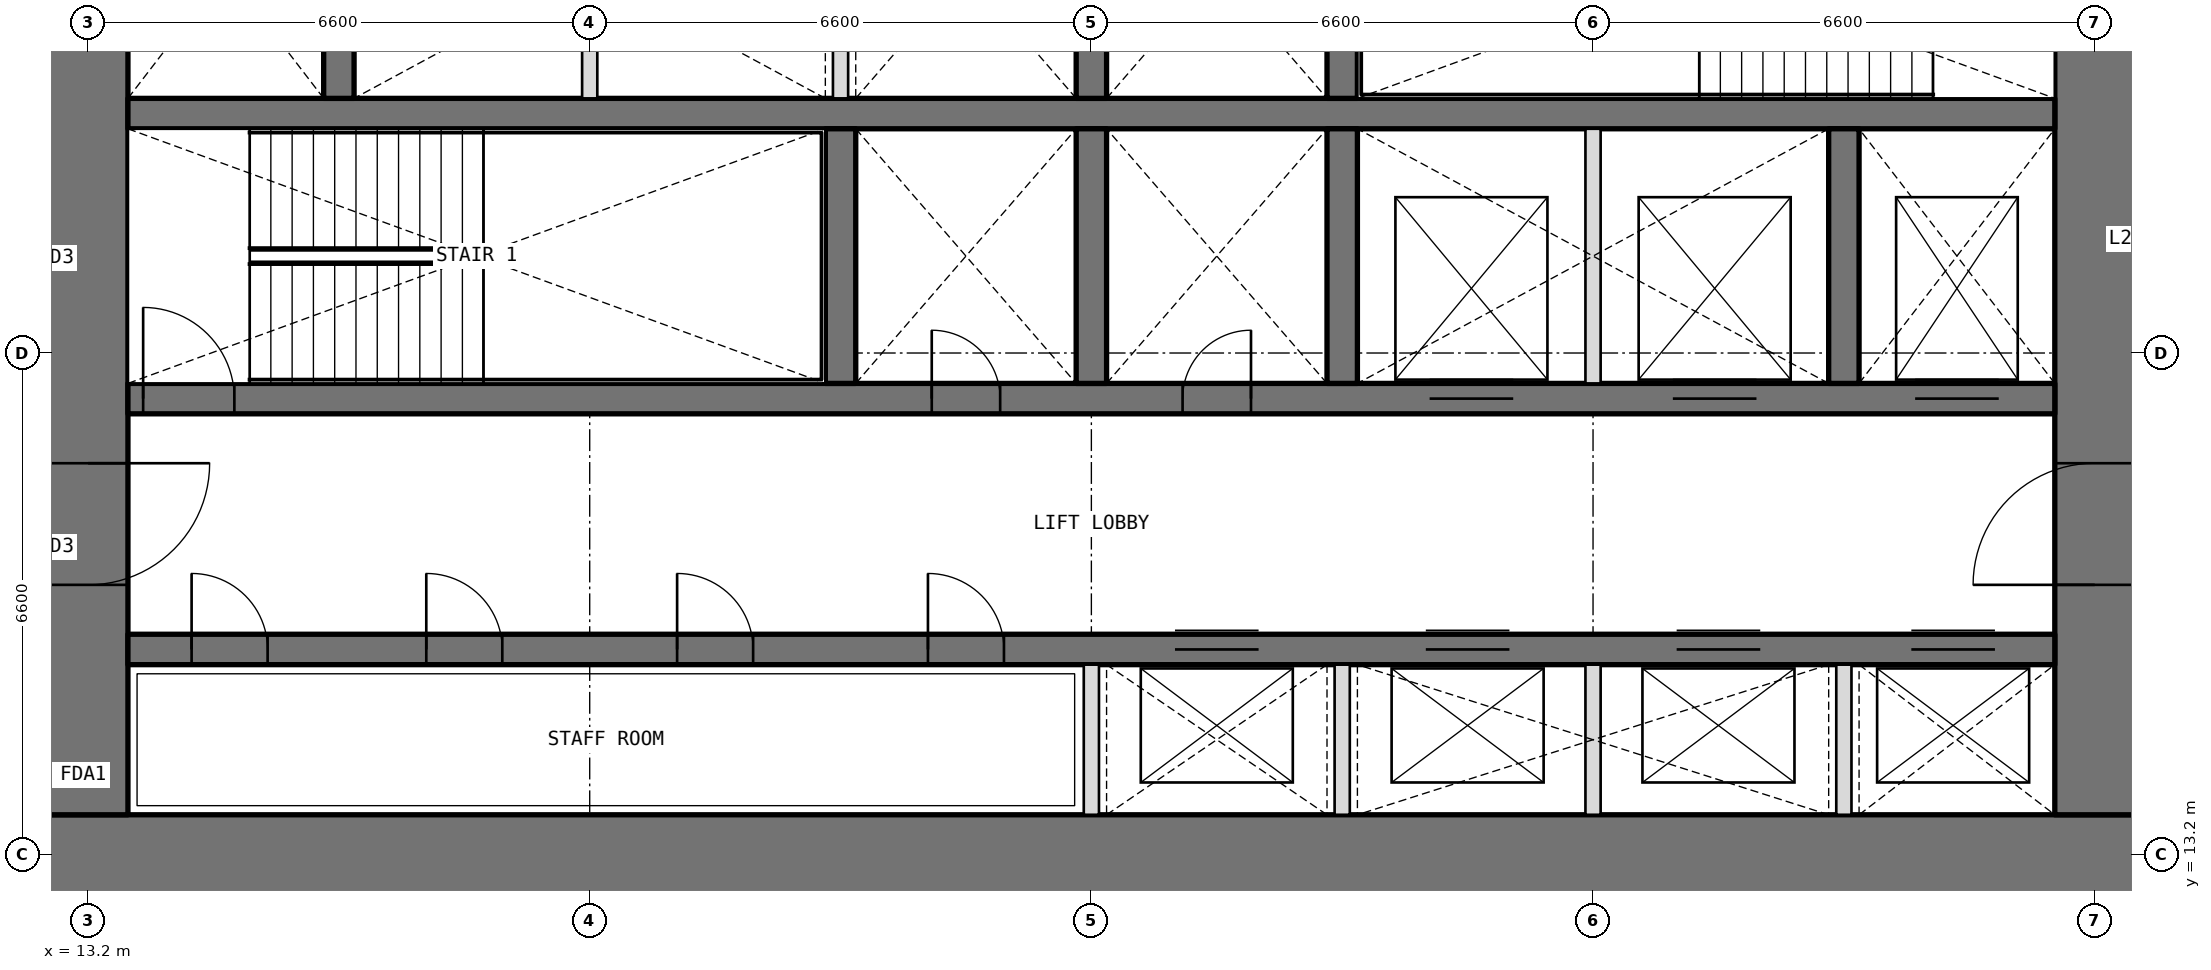
"""IFC4 building model, lengths in metres.
Left out: names, types, materials, properties, quantities, classifications, styles, units other than length and angle.
Written with IfcOpenShell. Run it as: python <this file> out.ifc"""

import sys

from ifc_helpers import new_model, si_unit, direction, frame, frame_2d, origin, place, context, subcontext, project, spatial, rectangle, extrude, element, fill, save


model = new_model("IFC4")
c1 = context("Model", 3, precision=1e-05, world=origin(), true_north=direction((0.0, 1.0)))
c2 = subcontext(c1, "Body", "Model", "MODEL_VIEW")
j1 = project(units=[si_unit("LENGTHUNIT", "METRE"), si_unit("PLANEANGLEUNIT", "RADIAN")], contexts=[c1])
p1 = place(None, origin())
s1 = spatial("IfcSite", under=j1, at=p1, CompositionType="ELEMENT")
p2 = place(p1, origin())
s2 = spatial("IfcBuilding", under=s1, at=p2, CompositionType="ELEMENT")
p3 = place(p2, frame((0.0, 0.0, 115.8)))
s3 = spatial("IfcBuildingStorey", under=s2, at=p3, CompositionType="ELEMENT", Elevation=115.8)
p4 = place(p3, frame((12.675, 13.2, 0.0), z_axis=(0.0, 0.0, 1.0), x_axis=(1.0, 0.0, 0.0)))
e1 = element("IfcWall", 1, at=p4, inside=s3, PredefinedType="SHEAR", context=c2, shape_type="SweptSolid", body=[
    extrude(rectangle(XDim=27.45, YDim=1.05, at=frame_2d((13.725, 0.0))), origin(), (0.0, 0.0, 1.0), 4.2),
])
p5 = place(p3, frame((39.6, 13.725, 0.0), z_axis=(0.0, 0.0, 1.0), x_axis=(0.0, 1.0, 0.0)))
e2 = element("IfcWall", 2, at=p5, inside=s3, PredefinedType="SHEAR", context=c2, shape_type="SweptSolid", body=[
    extrude(rectangle(XDim=18.75, YDim=1.05, at=frame_2d((9.375, 0.0))), origin(), (0.0, 0.0, 1.0), 4.2),
])
p6 = place(p5, frame((3.025, 0.0, 0.0)))
e3 = element("IfcOpeningElement", 3, at=p6, cuts=e2, PredefinedType="OPENING", context=c2, shape_type="SweptSolid", body=[
    extrude(rectangle(XDim=1.6, YDim=2.1, at=frame_2d((0.8, 1.05))), frame((0.0, 0.535, 0.0), z_axis=(0.0, -1.0, 0.0), x_axis=(1.0, 0.0, 0.0)), (0.0, 0.0, 1.0), 1.07),
])
p7 = place(p5, frame((13.825, 0.0, 0.0)))
e4 = element("IfcOpeningElement", 4, at=p7, cuts=e2, PredefinedType="OPENING", context=c2, shape_type="SweptSolid", body=[
    extrude(rectangle(XDim=1.6, YDim=2.1, at=frame_2d((0.8, 1.05))), frame((0.0, 0.535, 0.0), z_axis=(0.0, -1.0, 0.0), x_axis=(1.0, 0.0, 0.0)), (0.0, 0.0, 1.0), 1.07),
])
p8 = place(p3, frame((13.2, 32.475, 0.0), z_axis=(0.0, 0.0, 1.0), x_axis=(0.0, -1.0, 0.0)))
e5 = element("IfcWall", 5, at=p8, inside=s3, PredefinedType="SHEAR", context=c2, shape_type="SweptSolid", body=[
    extrude(rectangle(XDim=18.75, YDim=1.05, at=frame_2d((9.375, 0.0))), origin(), (0.0, 0.0, 1.0), 4.2),
])
p9 = place(p8, frame((14.125, 0.0, 0.0)))
e6 = element("IfcOpeningElement", 6, at=p9, cuts=e5, PredefinedType="OPENING", context=c2, shape_type="SweptSolid", body=[
    extrude(rectangle(XDim=1.6, YDim=2.1, at=frame_2d((0.8, 1.05))), frame((0.0, 0.535, 0.0), z_axis=(0.0, -1.0, 0.0), x_axis=(1.0, 0.0, 0.0)), (0.0, 0.0, 1.0), 1.07),
])
p10 = place(p8, frame((3.325, 0.0, 0.0)))
e7 = element("IfcOpeningElement", 7, at=p10, cuts=e5, PredefinedType="OPENING", context=c2, shape_type="SweptSolid", body=[
    extrude(rectangle(XDim=1.6, YDim=2.1, at=frame_2d((0.8, 1.05))), frame((0.0, 0.535, 0.0), z_axis=(0.0, -1.0, 0.0), x_axis=(1.0, 0.0, 0.0)), (0.0, 0.0, 1.0), 1.07),
])
p11 = place(p3, frame((13.725, 15.9, 0.0), z_axis=(0.0, 0.0, 1.0), x_axis=(1.0, 0.0, 0.0)))
e8 = element("IfcWall", 8, at=p11, inside=s3, PredefinedType="SHEAR", context=c2, shape_type="SweptSolid", body=[
    extrude(rectangle(XDim=25.35, YDim=0.4, at=frame_2d((12.675, 0.0))), origin(), (0.0, 0.0, 1.0), 4.2),
])
p12 = place(p11, frame((0.837, 0.0, 0.0)))
e9 = element("IfcOpeningElement", 9, at=p12, cuts=e8, PredefinedType="OPENING", context=c2, shape_type="SweptSolid", body=[
    extrude(rectangle(XDim=1.0, YDim=2.1, at=frame_2d((0.5, 1.05))), frame((0.0, 0.21, 0.0), z_axis=(0.0, -1.0, 0.0), x_axis=(1.0, 0.0, 0.0)), (0.0, 0.0, 1.0), 0.42),
])
p13 = place(p11, frame((3.925, 0.0, 0.0)))
e10 = element("IfcOpeningElement", 10, at=p13, cuts=e8, PredefinedType="OPENING", context=c2, shape_type="SweptSolid", body=[
    extrude(rectangle(XDim=1.0, YDim=2.1, at=frame_2d((0.5, 1.05))), frame((0.0, 0.21, 0.0), z_axis=(0.0, -1.0, 0.0), x_axis=(1.0, 0.0, 0.0)), (0.0, 0.0, 1.0), 0.42),
])
p14 = place(p11, frame((7.225, 0.0, 0.0)))
e11 = element("IfcOpeningElement", 11, at=p14, cuts=e8, PredefinedType="OPENING", context=c2, shape_type="SweptSolid", body=[
    extrude(rectangle(XDim=1.0, YDim=2.1, at=frame_2d((0.5, 1.05))), frame((0.0, 0.21, 0.0), z_axis=(0.0, -1.0, 0.0), x_axis=(1.0, 0.0, 0.0)), (0.0, 0.0, 1.0), 0.42),
])
p15 = place(p11, frame((10.525, 0.0, 0.0)))
e12 = element("IfcOpeningElement", 12, at=p15, cuts=e8, PredefinedType="OPENING", context=c2, shape_type="SweptSolid", body=[
    extrude(rectangle(XDim=1.0, YDim=2.1, at=frame_2d((0.5, 1.05))), frame((0.0, 0.21, 0.0), z_axis=(0.0, -1.0, 0.0), x_axis=(1.0, 0.0, 0.0)), (0.0, 0.0, 1.0), 0.42),
])
p16 = place(p11, frame((13.775, 0.0, 0.0)))
e13 = element("IfcOpeningElement", 13, at=p16, cuts=e8, PredefinedType="OPENING", context=c2, shape_type="SweptSolid", body=[
    extrude(rectangle(XDim=1.1, YDim=2.1, at=frame_2d((0.55, 1.05))), frame((0.0, 0.21, 0.0), z_axis=(0.0, -1.0, 0.0), x_axis=(1.0, 0.0, 0.0)), (0.0, 0.0, 1.0), 0.42),
])
p17 = place(p11, frame((17.075, 0.0, 0.0)))
e14 = element("IfcOpeningElement", 14, at=p17, cuts=e8, PredefinedType="OPENING", context=c2, shape_type="SweptSolid", body=[
    extrude(rectangle(XDim=1.1, YDim=2.1, at=frame_2d((0.55, 1.05))), frame((0.0, 0.21, 0.0), z_axis=(0.0, -1.0, 0.0), x_axis=(1.0, 0.0, 0.0)), (0.0, 0.0, 1.0), 0.42),
])
p18 = place(p11, frame((20.375, 0.0, 0.0)))
e15 = element("IfcOpeningElement", 15, at=p18, cuts=e8, PredefinedType="OPENING", context=c2, shape_type="SweptSolid", body=[
    extrude(rectangle(XDim=1.1, YDim=2.1, at=frame_2d((0.55, 1.05))), frame((0.0, 0.21, 0.0), z_axis=(0.0, -1.0, 0.0), x_axis=(1.0, 0.0, 0.0)), (0.0, 0.0, 1.0), 0.42),
])
p19 = place(p11, frame((23.462, 0.0, 0.0)))
e16 = element("IfcOpeningElement", 16, at=p19, cuts=e8, PredefinedType="OPENING", context=c2, shape_type="SweptSolid", body=[
    extrude(rectangle(XDim=1.1, YDim=2.1, at=frame_2d((0.55, 1.05))), frame((0.0, 0.21, 0.0), z_axis=(0.0, -1.0, 0.0), x_axis=(1.0, 0.0, 0.0)), (0.0, 0.0, 1.0), 0.42),
])
p20 = place(p3, frame((13.725, 19.2, 0.0), z_axis=(0.0, 0.0, 1.0), x_axis=(1.0, 0.0, 0.0)))
e17 = element("IfcWall", 17, at=p20, inside=s3, PredefinedType="SHEAR", context=c2, shape_type="SweptSolid", body=[
    extrude(rectangle(XDim=25.35, YDim=0.4, at=frame_2d((12.675, 0.0))), origin(), (0.0, 0.0, 1.0), 4.2),
])
p21 = place(p20, frame((10.575, 0.0, 0.0)))
e18 = element("IfcOpeningElement", 18, at=p21, cuts=e17, PredefinedType="OPENING", context=c2, shape_type="SweptSolid", body=[
    extrude(rectangle(XDim=0.9, YDim=2.1, at=frame_2d((0.45, 1.05))), frame((0.0, 0.21, 0.0), z_axis=(0.0, -1.0, 0.0), x_axis=(1.0, 0.0, 0.0)), (0.0, 0.0, 1.0), 0.42),
])
p22 = place(p20, frame((13.875, 0.0, 0.0)))
e19 = element("IfcOpeningElement", 19, at=p22, cuts=e17, PredefinedType="OPENING", context=c2, shape_type="SweptSolid", body=[
    extrude(rectangle(XDim=0.9, YDim=2.1, at=frame_2d((0.45, 1.05))), frame((0.0, 0.21, 0.0), z_axis=(0.0, -1.0, 0.0), x_axis=(1.0, 0.0, 0.0)), (0.0, 0.0, 1.0), 0.42),
])
p23 = place(p20, frame((0.2, 0.0, 0.0)))
e20 = element("IfcOpeningElement", 20, at=p23, cuts=e17, PredefinedType="OPENING", context=c2, shape_type="SweptSolid", body=[
    extrude(rectangle(XDim=1.2, YDim=2.1, at=frame_2d((0.6, 1.05))), frame((0.0, 0.21, 0.0), z_axis=(0.0, -1.0, 0.0), x_axis=(1.0, 0.0, 0.0)), (0.0, 0.0, 1.0), 0.42),
])
p24 = place(p20, frame((23.512, 0.0, 0.0)))
e21 = element("IfcOpeningElement", 21, at=p24, cuts=e17, PredefinedType="OPENING", context=c2, shape_type="SweptSolid", body=[
    extrude(rectangle(XDim=1.1, YDim=2.1, at=frame_2d((0.55, 1.05))), frame((0.0, 0.21, 0.0), z_axis=(0.0, -1.0, 0.0), x_axis=(1.0, 0.0, 0.0)), (0.0, 0.0, 1.0), 0.42),
])
p25 = place(p20, frame((17.125, 0.0, 0.0)))
e22 = element("IfcOpeningElement", 22, at=p25, cuts=e17, PredefinedType="OPENING", context=c2, shape_type="SweptSolid", body=[
    extrude(rectangle(XDim=1.1, YDim=2.1, at=frame_2d((0.55, 1.05))), frame((0.0, 0.21, 0.0), z_axis=(0.0, -1.0, 0.0), x_axis=(1.0, 0.0, 0.0)), (0.0, 0.0, 1.0), 0.42),
])
p26 = place(p20, frame((20.325, 0.0, 0.0)))
e23 = element("IfcOpeningElement", 23, at=p26, cuts=e17, PredefinedType="OPENING", context=c2, shape_type="SweptSolid", body=[
    extrude(rectangle(XDim=1.1, YDim=2.1, at=frame_2d((0.55, 1.05))), frame((0.0, 0.21, 0.0), z_axis=(0.0, -1.0, 0.0), x_axis=(1.0, 0.0, 0.0)), (0.0, 0.0, 1.0), 0.42),
])
p27 = place(p3, frame((13.725, 22.95, 0.0), z_axis=(0.0, 0.0, 1.0), x_axis=(1.0, 0.0, 0.0)))
e24 = element("IfcWall", 24, at=p27, inside=s3, PredefinedType="SHEAR", context=c2, shape_type="SweptSolid", body=[
    extrude(rectangle(XDim=25.35, YDim=0.4, at=frame_2d((12.675, 0.0))), origin(), (0.0, 0.0, 1.0), 4.2),
])
for number, where, z_axis, x_axis in (
    (25, (23.1, 19.4, 0.0), (0.0, 0.0, 1.0), (0.0, 1.0, 0.0)),
    (26, (26.4, 19.4, 0.0), (0.0, 0.0, 1.0), (0.0, 1.0, 0.0)),
    (27, (29.7, 19.4, 0.0), (0.0, 0.0, 1.0), (0.0, 1.0, 0.0)),
    (28, (36.3, 19.4, 0.0), (0.0, 0.0, 1.0), (0.0, 1.0, 0.0)),
    (29, (16.5, 23.15, 0.0), (0.0, 0.0, 1.0), (0.0, 1.0, 0.0)),
    (30, (26.4, 23.15, 0.0), (0.0, 0.0, 1.0), (0.0, 1.0, 0.0)),
    (31, (29.7, 23.15, 0.0), (0.0, 0.0, 1.0), (0.0, 1.0, 0.0)),
):
    element("IfcWall", number, at=place(p3, frame(where, z_axis=z_axis, x_axis=x_axis)), inside=s3, PredefinedType="SHEAR", context=c2, shape_type="SweptSolid", body=[
        extrude(rectangle(XDim=3.35, YDim=0.4, at=frame_2d((1.675, 0.0))), origin(), (0.0, 0.0, 1.0), 4.2),
    ])
for number, where, z_axis, x_axis in (
    (32, (26.4, 13.725, 0.0), (0.0, 0.0, 1.0), (0.0, 1.0, 0.0)),
    (33, (29.7, 13.725, 0.0), (0.0, 0.0, 1.0), (0.0, 1.0, 0.0)),
    (34, (33.0, 13.725, 0.0), (0.0, 0.0, 1.0), (0.0, 1.0, 0.0)),
    (35, (36.3, 13.725, 0.0), (0.0, 0.0, 1.0), (0.0, 1.0, 0.0)),
):
    element("IfcWall", number, at=place(p3, frame(where, z_axis=z_axis, x_axis=x_axis)), inside=s3, PredefinedType="PARTITIONING", context=c2, shape_type="SweptSolid", body=[
        extrude(rectangle(XDim=1.975, YDim=0.2, at=frame_2d((0.987, 0.0))), origin(), (0.0, 0.0, 1.0), 4.2),
    ])
for number, where, z_axis, x_axis in (
    (36, (33.0, 19.4, 0.0), (0.0, 0.0, 1.0), (0.0, 1.0, 0.0)),
    (37, (19.8, 23.15, 0.0), (0.0, 0.0, 1.0), (0.0, 1.0, 0.0)),
    (38, (23.1, 23.15, 0.0), (0.0, 0.0, 1.0), (0.0, 1.0, 0.0)),
):
    element("IfcWall", number, at=place(p3, frame(where, z_axis=z_axis, x_axis=x_axis)), inside=s3, PredefinedType="PARTITIONING", context=c2, shape_type="SweptSolid", body=[
        extrude(rectangle(XDim=3.35, YDim=0.2, at=frame_2d((1.675, 0.0))), origin(), (0.0, 0.0, 1.0), 4.2),
    ])
p28 = place(p21, origin())
e39 = element("IfcDoor", 39, at=p28, inside=s3, OperationType="SINGLE_SWING_LEFT", PredefinedType="DOOR", context=c2, shape_type="SweptSolid", body=[
    extrude(rectangle(XDim=0.9, YDim=2.1, at=frame_2d((0.45, 1.05))), frame((0.0, 0.025, 0.0), z_axis=(0.0, -1.0, 0.0), x_axis=(1.0, 0.0, 0.0)), (0.0, 0.0, 1.0), 0.05),
])
fill(e18, e39)
p29 = place(p22, origin())
e40 = element("IfcDoor", 40, at=p29, inside=s3, OperationType="SINGLE_SWING_RIGHT", PredefinedType="DOOR", context=c2, shape_type="SweptSolid", body=[
    extrude(rectangle(XDim=0.9, YDim=2.1, at=frame_2d((0.45, 1.05))), frame((0.0, 0.025, 0.0), z_axis=(0.0, -1.0, 0.0), x_axis=(1.0, 0.0, 0.0)), (0.0, 0.0, 1.0), 0.05),
])
fill(e19, e40)
p30 = place(p12, origin())
e41 = element("IfcDoor", 41, at=p30, inside=s3, OperationType="SINGLE_SWING_LEFT", PredefinedType="DOOR", context=c2, shape_type="SweptSolid", body=[
    extrude(rectangle(XDim=1.0, YDim=2.1, at=frame_2d((0.5, 1.05))), frame((0.0, 0.025, 0.0), z_axis=(0.0, -1.0, 0.0), x_axis=(1.0, 0.0, 0.0)), (0.0, 0.0, 1.0), 0.05),
])
fill(e9, e41)
p31 = place(p13, origin())
e42 = element("IfcDoor", 42, at=p31, inside=s3, OperationType="SINGLE_SWING_LEFT", PredefinedType="DOOR", context=c2, shape_type="SweptSolid", body=[
    extrude(rectangle(XDim=1.0, YDim=2.1, at=frame_2d((0.5, 1.05))), frame((0.0, 0.025, 0.0), z_axis=(0.0, -1.0, 0.0), x_axis=(1.0, 0.0, 0.0)), (0.0, 0.0, 1.0), 0.05),
])
fill(e10, e42)
p32 = place(p14, origin())
e43 = element("IfcDoor", 43, at=p32, inside=s3, OperationType="SINGLE_SWING_LEFT", PredefinedType="DOOR", context=c2, shape_type="SweptSolid", body=[
    extrude(rectangle(XDim=1.0, YDim=2.1, at=frame_2d((0.5, 1.05))), frame((0.0, 0.025, 0.0), z_axis=(0.0, -1.0, 0.0), x_axis=(1.0, 0.0, 0.0)), (0.0, 0.0, 1.0), 0.05),
])
fill(e11, e43)
p33 = place(p15, origin())
e44 = element("IfcDoor", 44, at=p33, inside=s3, OperationType="SINGLE_SWING_LEFT", PredefinedType="DOOR", context=c2, shape_type="SweptSolid", body=[
    extrude(rectangle(XDim=1.0, YDim=2.1, at=frame_2d((0.5, 1.05))), frame((0.0, 0.025, 0.0), z_axis=(0.0, -1.0, 0.0), x_axis=(1.0, 0.0, 0.0)), (0.0, 0.0, 1.0), 0.05),
])
fill(e12, e44)
p34 = place(p23, origin())
e45 = element("IfcDoor", 45, at=p34, inside=s3, OperationType="SINGLE_SWING_LEFT", PredefinedType="DOOR", context=c2, shape_type="SweptSolid", body=[
    extrude(rectangle(XDim=1.2, YDim=2.1, at=frame_2d((0.6, 1.05))), frame((0.0, 0.025, 0.0), z_axis=(0.0, -1.0, 0.0), x_axis=(1.0, 0.0, 0.0)), (0.0, 0.0, 1.0), 0.05),
])
fill(e20, e45)
p35 = place(p9, origin())
e46 = element("IfcDoor", 46, at=p35, inside=s3, OperationType="DOUBLE_DOOR_DOUBLE_SWING", PredefinedType="DOOR", context=c2, shape_type="SweptSolid", body=[
    extrude(rectangle(XDim=1.6, YDim=2.1, at=frame_2d((0.8, 1.05))), frame((0.0, 0.025, 0.0), z_axis=(0.0, -1.0, 0.0), x_axis=(1.0, 0.0, 0.0)), (0.0, 0.0, 1.0), 0.05),
])
fill(e6, e46)
p36 = place(p6, origin())
e47 = element("IfcDoor", 47, at=p36, inside=s3, OperationType="DOUBLE_DOOR_DOUBLE_SWING", PredefinedType="DOOR", context=c2, shape_type="SweptSolid", body=[
    extrude(rectangle(XDim=1.6, YDim=2.1, at=frame_2d((0.8, 1.05))), frame((0.0, 0.025, 0.0), z_axis=(0.0, -1.0, 0.0), x_axis=(1.0, 0.0, 0.0)), (0.0, 0.0, 1.0), 0.05),
])
fill(e3, e47)
p37 = place(p16, origin())
e48 = element("IfcDoor", 48, at=p37, inside=s3, OperationType="DOUBLE_DOOR_SLIDING", PredefinedType="DOOR", context=c2, shape_type="SweptSolid", body=[
    extrude(rectangle(XDim=1.1, YDim=2.1, at=frame_2d((0.55, 1.05))), frame((0.0, 0.025, 0.0), z_axis=(0.0, -1.0, 0.0), x_axis=(1.0, 0.0, 0.0)), (0.0, 0.0, 1.0), 0.05),
])
fill(e13, e48)
p38 = place(p17, origin())
e49 = element("IfcDoor", 49, at=p38, inside=s3, OperationType="DOUBLE_DOOR_SLIDING", PredefinedType="DOOR", context=c2, shape_type="SweptSolid", body=[
    extrude(rectangle(XDim=1.1, YDim=2.1, at=frame_2d((0.55, 1.05))), frame((0.0, 0.025, 0.0), z_axis=(0.0, -1.0, 0.0), x_axis=(1.0, 0.0, 0.0)), (0.0, 0.0, 1.0), 0.05),
])
fill(e14, e49)
p39 = place(p18, origin())
e50 = element("IfcDoor", 50, at=p39, inside=s3, OperationType="DOUBLE_DOOR_SLIDING", PredefinedType="DOOR", context=c2, shape_type="SweptSolid", body=[
    extrude(rectangle(XDim=1.1, YDim=2.1, at=frame_2d((0.55, 1.05))), frame((0.0, 0.025, 0.0), z_axis=(0.0, -1.0, 0.0), x_axis=(1.0, 0.0, 0.0)), (0.0, 0.0, 1.0), 0.05),
])
fill(e15, e50)
p40 = place(p19, origin())
e51 = element("IfcDoor", 51, at=p40, inside=s3, OperationType="DOUBLE_DOOR_SLIDING", PredefinedType="DOOR", context=c2, shape_type="SweptSolid", body=[
    extrude(rectangle(XDim=1.1, YDim=2.1, at=frame_2d((0.55, 1.05))), frame((0.0, 0.025, 0.0), z_axis=(0.0, -1.0, 0.0), x_axis=(1.0, 0.0, 0.0)), (0.0, 0.0, 1.0), 0.05),
])
fill(e16, e51)
p41 = place(p24, origin())
e52 = element("IfcDoor", 52, at=p41, inside=s3, OperationType="DOUBLE_DOOR_SLIDING", PredefinedType="DOOR", context=c2, shape_type="SweptSolid", body=[
    extrude(rectangle(XDim=1.1, YDim=2.1, at=frame_2d((0.55, 1.05))), frame((0.0, 0.025, 0.0), z_axis=(0.0, -1.0, 0.0), x_axis=(1.0, 0.0, 0.0)), (0.0, 0.0, 1.0), 0.05),
])
fill(e21, e52)
p42 = place(p25, origin())
e53 = element("IfcDoor", 53, at=p42, inside=s3, OperationType="DOUBLE_DOOR_SLIDING", PredefinedType="DOOR", context=c2, shape_type="SweptSolid", body=[
    extrude(rectangle(XDim=1.1, YDim=2.1, at=frame_2d((0.55, 1.05))), frame((0.0, 0.025, 0.0), z_axis=(0.0, -1.0, 0.0), x_axis=(1.0, 0.0, 0.0)), (0.0, 0.0, 1.0), 0.05),
])
fill(e22, e53)
p43 = place(p26, origin())
e54 = element("IfcDoor", 54, at=p43, inside=s3, OperationType="DOUBLE_DOOR_SLIDING", PredefinedType="DOOR", context=c2, shape_type="SweptSolid", body=[
    extrude(rectangle(XDim=1.1, YDim=2.1, at=frame_2d((0.55, 1.05))), frame((0.0, 0.025, 0.0), z_axis=(0.0, -1.0, 0.0), x_axis=(1.0, 0.0, 0.0)), (0.0, 0.0, 1.0), 0.05),
])
fill(e23, e54)
save(model, sys.argv[1])
